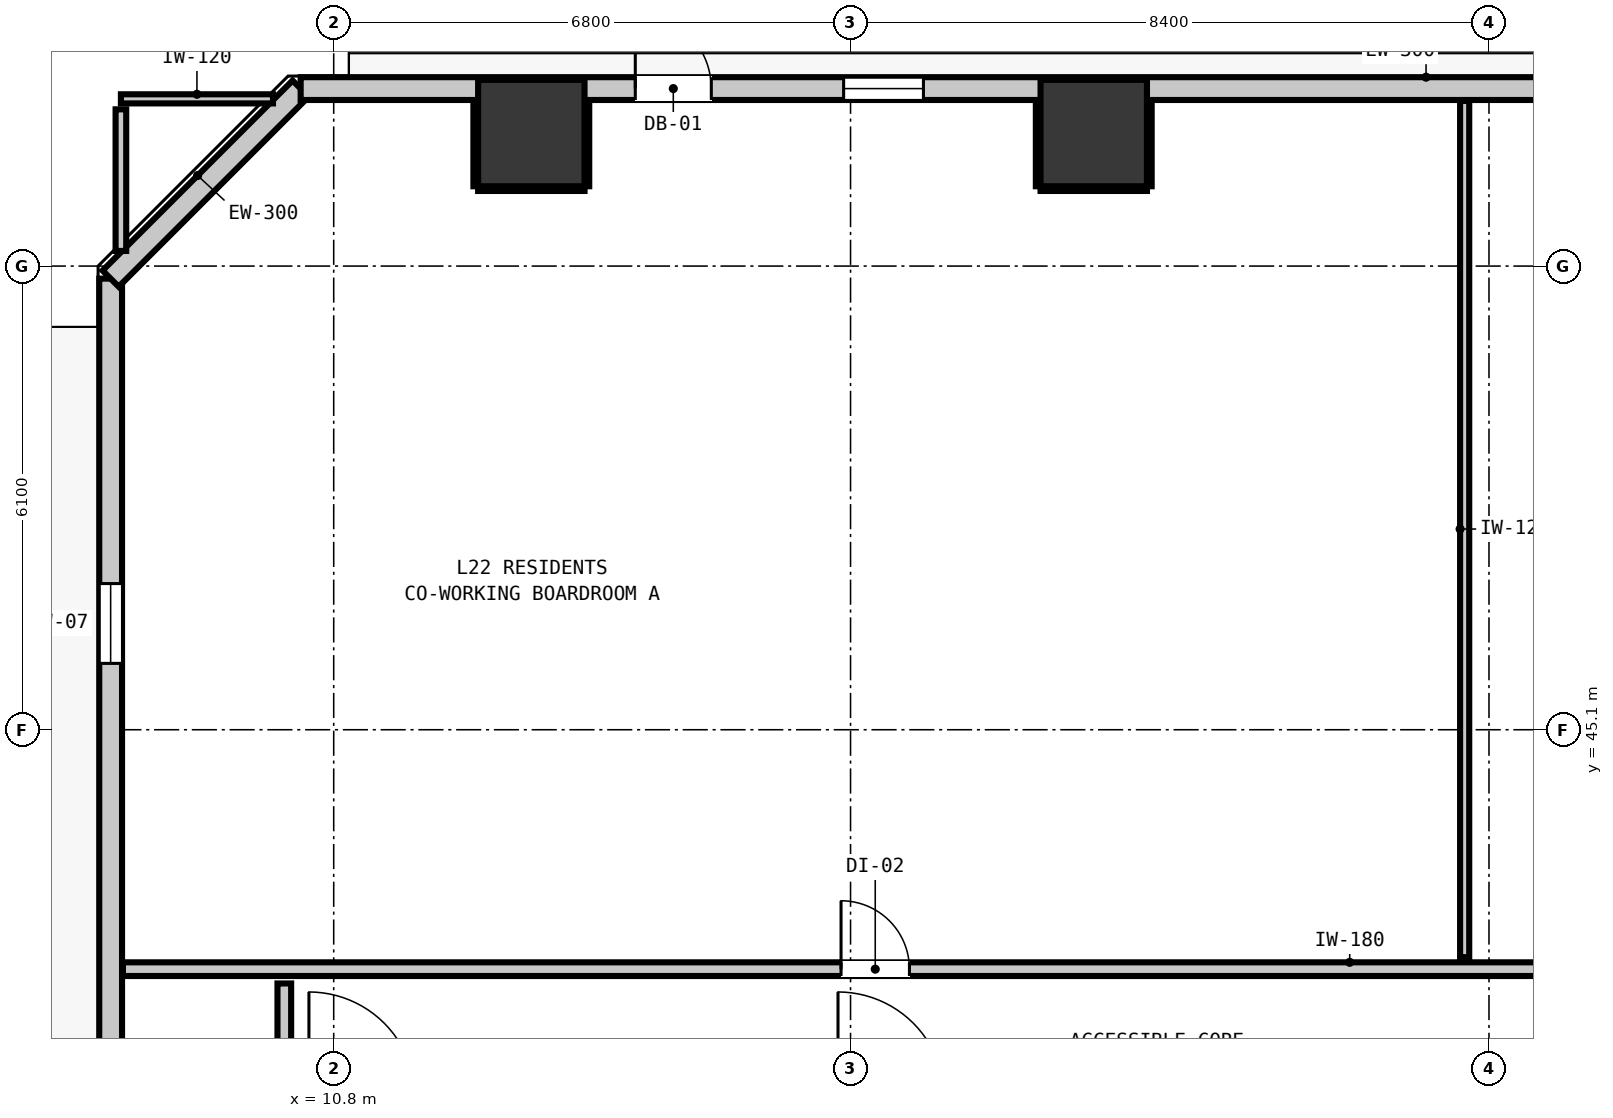
"""IFC4 building model, lengths in metres.
Left out: names, types, materials, properties, quantities, classifications, styles, units other than length and angle.
Written with IfcOpenShell. Run it as: python <this file> out.ifc"""

import sys

from ifc_helpers import new_model, si_unit, direction, frame, frame_2d, origin, origin_2d, place, context, subcontext, project, spatial, rectangle, extrude, element, fill, save


model = new_model("IFC4")
c1 = context("Model", 3, precision=1e-05, world=origin(), true_north=direction((0.0, 1.0)))
c2 = subcontext(c1, "Body", "Model", "MODEL_VIEW")
j1 = project(units=[si_unit("LENGTHUNIT", "METRE"), si_unit("PLANEANGLEUNIT", "RADIAN")], contexts=[c1])
p1 = place(None, origin())
s1 = spatial("IfcSite", under=j1, at=p1, CompositionType="ELEMENT")
p2 = place(p1, origin())
s2 = spatial("IfcBuilding", under=s1, at=p2, CompositionType="ELEMENT")
p3 = place(p2, frame((0.0, 0.0, 78.44)))
s3 = spatial("IfcBuildingStorey", under=s2, at=p3, CompositionType="ELEMENT", Elevation=78.44)
for number, where, z_axis, x_axis in (
    (1, (13.4, 52.95, 0.0), (0.0, 0.0, 1.0), (1.0, 0.0, 0.0)),
    (2, (20.8, 52.95, 0.0), (0.0, 0.0, 1.0), (1.0, 0.0, 0.0)),
):
    element("IfcColumn", number, at=place(p3, frame(where, z_axis=z_axis, x_axis=x_axis)), inside=s3, PredefinedType="COLUMN", context=c2, shape_type="SweptSolid", body=[
        extrude(rectangle(XDim=1.4, YDim=1.4, at=origin_2d()), origin(), (0.0, 0.0, 1.0), 2.9),
    ])
p4 = place(p3, frame((7.865, 16.365, 0.0), z_axis=(0.0, 0.0, 1.0), x_axis=(0.0, 1.0, 0.0)))
e3 = element("IfcWall", 3, at=p4, inside=s3, PredefinedType="STANDARD", context=c2, shape_type="SweptSolid", body=[
    extrude(rectangle(XDim=34.67, YDim=0.3, at=frame_2d((17.335, 0.0))), origin(), (0.0, 0.0, 1.0), 2.9),
])
p5 = place(p4, frame((6.854, 0.0, 0.0)))
e4 = element("IfcOpeningElement", 4, at=p5, cuts=e3, PredefinedType="OPENING", context=c2, shape_type="SweptSolid", body=[
    extrude(rectangle(XDim=1.0, YDim=2.15, at=frame_2d((0.5, 1.075))), frame((0.0, 0.16, 0.0), z_axis=(0.0, -1.0, 0.0), x_axis=(1.0, 0.0, 0.0)), (0.0, 0.0, 1.0), 0.32),
])
p6 = place(p4, frame((29.608, 0.0, 0.85)))
e5 = element("IfcOpeningElement", 5, at=p6, cuts=e3, PredefinedType="OPENING", context=c2, shape_type="SweptSolid", body=[
    extrude(rectangle(XDim=1.05, YDim=1.65, at=frame_2d((0.525, 0.825))), frame((0.0, 0.16, 0.0), z_axis=(0.0, -1.0, 0.0), x_axis=(1.0, 0.0, 0.0)), (0.0, 0.0, 1.0), 0.32),
])
p7 = place(p4, frame((10.325, 0.0, 0.85)))
e6 = element("IfcOpeningElement", 6, at=p7, cuts=e3, PredefinedType="OPENING", context=c2, shape_type="SweptSolid", body=[
    extrude(rectangle(XDim=1.05, YDim=1.65, at=frame_2d((0.525, 0.825))), frame((0.0, 0.16, 0.0), z_axis=(0.0, -1.0, 0.0), x_axis=(1.0, 0.0, 0.0)), (0.0, 0.0, 1.0), 0.32),
])
p8 = place(p3, frame((7.865, 51.035, 0.0), z_axis=(0.0, 0.0, 1.0), x_axis=(0.707106781187, 0.707106781187, 0.0)))
e7 = element("IfcWall", 7, at=p8, inside=s3, PredefinedType="STANDARD", context=c2, shape_type="SweptSolid", body=[
    extrude(rectangle(XDim=3.536, YDim=0.3, at=frame_2d((1.768, 0.0))), origin(), (0.0, 0.0, 1.0), 2.9),
])
p9 = place(p3, frame((10.365, 53.535, 0.0), z_axis=(0.0, 0.0, 1.0), x_axis=(1.0, 0.0, 0.0)))
e8 = element("IfcWall", 8, at=p9, inside=s3, PredefinedType="STANDARD", context=c2, shape_type="SweptSolid", body=[
    extrude(rectangle(XDim=37.47, YDim=0.3, at=frame_2d((18.735, 0.0))), origin(), (0.0, 0.0, 1.0), 2.9),
])
p10 = place(p9, frame((4.403, 0.0, 0.0)))
e9 = element("IfcOpeningElement", 9, at=p10, cuts=e8, PredefinedType="OPENING", context=c2, shape_type="SweptSolid", body=[
    extrude(rectangle(XDim=1.0, YDim=2.15, at=frame_2d((0.5, 1.075))), frame((0.0, 0.16, 0.0), z_axis=(0.0, -1.0, 0.0), x_axis=(1.0, 0.0, 0.0)), (0.0, 0.0, 1.0), 0.32),
])
p11 = place(p9, frame((7.144, 0.0, 0.85)))
e10 = element("IfcOpeningElement", 10, at=p11, cuts=e8, PredefinedType="OPENING", context=c2, shape_type="SweptSolid", body=[
    extrude(rectangle(XDim=1.05, YDim=1.65, at=frame_2d((0.525, 0.825))), frame((0.0, 0.16, 0.0), z_axis=(0.0, -1.0, 0.0), x_axis=(1.0, 0.0, 0.0)), (0.0, 0.0, 1.0), 0.32),
])
p12 = place(p9, frame((21.42, 0.0, 0.85)))
e11 = element("IfcOpeningElement", 11, at=p12, cuts=e8, PredefinedType="OPENING", context=c2, shape_type="SweptSolid", body=[
    extrude(rectangle(XDim=1.05, YDim=1.65, at=frame_2d((0.525, 0.825))), frame((0.0, 0.16, 0.0), z_axis=(0.0, -1.0, 0.0), x_axis=(1.0, 0.0, 0.0)), (0.0, 0.0, 1.0), 0.32),
])
p13 = place(p9, frame((31.038, 0.0, 0.85)))
e12 = element("IfcOpeningElement", 12, at=p13, cuts=e8, PredefinedType="OPENING", context=c2, shape_type="SweptSolid", body=[
    extrude(rectangle(XDim=1.05, YDim=1.65, at=frame_2d((0.525, 0.825))), frame((0.0, 0.16, 0.0), z_axis=(0.0, -1.0, 0.0), x_axis=(1.0, 0.0, 0.0)), (0.0, 0.0, 1.0), 0.32),
])
p14 = place(p9, frame((27.107, 0.0, 0.85)))
e13 = element("IfcOpeningElement", 13, at=p14, cuts=e8, PredefinedType="OPENING", context=c2, shape_type="SweptSolid", body=[
    extrude(rectangle(XDim=0.58, YDim=1.5, at=frame_2d((0.29, 0.75))), frame((0.0, 0.16, 0.0), z_axis=(0.0, -1.0, 0.0), x_axis=(1.0, 0.0, 0.0)), (0.0, 0.0, 1.0), 0.32),
])
p15 = place(p9, frame((35.748, 0.0, 0.85)))
e14 = element("IfcOpeningElement", 14, at=p15, cuts=e8, PredefinedType="OPENING", context=c2, shape_type="SweptSolid", body=[
    extrude(rectangle(XDim=1.05, YDim=1.65, at=frame_2d((0.525, 0.825))), frame((0.0, 0.16, 0.0), z_axis=(0.0, -1.0, 0.0), x_axis=(1.0, 0.0, 0.0)), (0.0, 0.0, 1.0), 0.32),
])
p16 = place(p3, frame((8.027, 41.95, 0.0), z_axis=(0.0, 0.0, 1.0), x_axis=(1.0, 0.0, 0.0)))
e15 = element("IfcWall", 15, at=p16, inside=s3, PredefinedType="PARTITIONING", context=c2, shape_type="SweptSolid", body=[
    extrude(rectangle(XDim=42.146, YDim=0.18, at=frame_2d((21.073, 0.0))), origin(), (0.0, 0.0, 1.0), 2.9),
])
p17 = place(p16, frame((9.448, 0.0, 0.0)))
e16 = element("IfcOpeningElement", 16, at=p17, cuts=e15, PredefinedType="OPENING", context=c2, shape_type="SweptSolid", body=[
    extrude(rectangle(XDim=0.9, YDim=2.1, at=frame_2d((0.45, 1.05))), frame((0.0, 0.1, 0.0), z_axis=(0.0, -1.0, 0.0), x_axis=(1.0, 0.0, 0.0)), (0.0, 0.0, 1.0), 0.2),
])
p18 = place(p16, frame((21.933, 0.0, 0.0)))
e17 = element("IfcOpeningElement", 17, at=p18, cuts=e15, PredefinedType="OPENING", context=c2, shape_type="SweptSolid", body=[
    extrude(rectangle(XDim=0.9, YDim=2.1, at=frame_2d((0.45, 1.05))), frame((0.0, 0.1, 0.0), z_axis=(0.0, -1.0, 0.0), x_axis=(1.0, 0.0, 0.0)), (0.0, 0.0, 1.0), 0.2),
])
p19 = place(p16, frame((33.401, 0.0, 0.0)))
e18 = element("IfcOpeningElement", 18, at=p19, cuts=e15, PredefinedType="OPENING", context=c2, shape_type="SweptSolid", body=[
    extrude(rectangle(XDim=1.0, YDim=2.15, at=frame_2d((0.5, 1.075))), frame((0.0, 0.1, 0.0), z_axis=(0.0, -1.0, 0.0), x_axis=(1.0, 0.0, 0.0)), (0.0, 0.0, 1.0), 0.2),
])
p20 = place(p3, frame((8.0, 53.4, 0.0), z_axis=(0.0, 0.0, 1.0), x_axis=(1.0, 0.0, 0.0)))
e19 = element("IfcWall", 19, at=p20, inside=s3, PredefinedType="PARTITIONING", context=c2, shape_type="SweptSolid", body=[
    extrude(rectangle(XDim=2.001, YDim=0.12, at=frame_2d((1.0, 0.0))), origin(), (0.0, 0.0, 1.0), 2.9),
])
p21 = place(p3, frame((10.15, 40.438, 0.0), z_axis=(0.0, 0.0, 1.0), x_axis=(0.0, 1.0, 0.0)))
e20 = element("IfcWall", 20, at=p21, inside=s3, PredefinedType="PARTITIONING", context=c2, shape_type="SweptSolid", body=[
    extrude(rectangle(XDim=1.324, YDim=0.18, at=frame_2d((0.662, 0.0))), origin(), (0.0, 0.0, 1.0), 2.9),
])
p22 = place(p3, frame((8.0, 51.399, 0.0), z_axis=(0.0, 0.0, 1.0), x_axis=(0.0, 1.0, 0.0)))
e21 = element("IfcWall", 21, at=p22, inside=s3, PredefinedType="PARTITIONING", context=c2, shape_type="SweptSolid", body=[
    extrude(rectangle(XDim=1.863, YDim=0.14, at=frame_2d((0.932, 0.0))), origin(), (0.0, 0.0, 1.0), 2.9),
])
p23 = place(p3, frame((25.68, 42.108, 0.0), z_axis=(0.0, 0.0, 1.0), x_axis=(0.0, 1.0, 0.0)))
e22 = element("IfcWall", 22, at=p23, inside=s3, PredefinedType="PARTITIONING", context=c2, shape_type="SweptSolid", body=[
    extrude(rectangle(XDim=11.265, YDim=0.12, at=frame_2d((5.633, 0.0))), origin(), (0.0, 0.0, 1.0), 2.9),
])
p24 = place(p3, frame((12.7, 52.218, 0.0), z_axis=(0.0, 0.0, 1.0), x_axis=(1.0, 0.0, 0.0)))
e23 = element("IfcWall", 23, at=p24, inside=s3, PredefinedType="PARTITIONING", context=c2, shape_type="SweptSolid", body=[
    extrude(rectangle(XDim=1.4, YDim=0.06, at=frame_2d((0.7, 0.0))), origin(), (0.0, 0.0, 1.0), 1.45),
])
for number, where, z_axis, x_axis in (
    (24, (12.668, 52.25, 0.0), (0.0, 0.0, 1.0), (0.0, 1.0, 0.0)),
    (25, (14.132, 52.25, 0.0), (0.0, 0.0, 1.0), (0.0, 1.0, 0.0)),
):
    element("IfcWall", number, at=place(p3, frame(where, z_axis=z_axis, x_axis=x_axis)), inside=s3, PredefinedType="PARTITIONING", context=c2, shape_type="SweptSolid", body=[
        extrude(rectangle(XDim=1.12, YDim=0.06, at=frame_2d((0.56, 0.0))), origin(), (0.0, 0.0, 1.0), 1.45),
    ])
p25 = place(p3, frame((20.1, 52.218, 0.0), z_axis=(0.0, 0.0, 1.0), x_axis=(1.0, 0.0, 0.0)))
e26 = element("IfcWall", 26, at=p25, inside=s3, PredefinedType="PARTITIONING", context=c2, shape_type="SweptSolid", body=[
    extrude(rectangle(XDim=1.4, YDim=0.06, at=frame_2d((0.7, 0.0))), origin(), (0.0, 0.0, 1.0), 1.45),
])
for number, where, z_axis, x_axis in (
    (27, (20.068, 52.25, 0.0), (0.0, 0.0, 1.0), (0.0, 1.0, 0.0)),
    (28, (21.532, 52.25, 0.0), (0.0, 0.0, 1.0), (0.0, 1.0, 0.0)),
):
    element("IfcWall", number, at=place(p3, frame(where, z_axis=z_axis, x_axis=x_axis)), inside=s3, PredefinedType="PARTITIONING", context=c2, shape_type="SweptSolid", body=[
        extrude(rectangle(XDim=1.12, YDim=0.06, at=frame_2d((0.56, 0.0))), origin(), (0.0, 0.0, 1.0), 1.45),
    ])
p26 = place(p10, origin())
e29 = element("IfcDoor", 29, at=p26, inside=s3, OperationType="SINGLE_SWING_LEFT", PredefinedType="DOOR", context=c2, shape_type="SweptSolid", body=[
    extrude(rectangle(XDim=1.0, YDim=2.15, at=frame_2d((0.5, 1.075))), frame((0.0, 0.025, 0.0), z_axis=(0.0, -1.0, 0.0), x_axis=(1.0, 0.0, 0.0)), (0.0, 0.0, 1.0), 0.05),
])
fill(e9, e29)
p27 = place(p6, origin())
e30 = element("IfcWindow", 30, at=p27, inside=s3, PartitioningType="SINGLE_PANEL", PredefinedType="WINDOW", context=c2, shape_type="SweptSolid", body=[
    extrude(rectangle(XDim=1.05, YDim=1.65, at=frame_2d((0.525, 0.825))), frame((0.0, 0.03, 0.0), z_axis=(0.0, -1.0, 0.0), x_axis=(1.0, 0.0, 0.0)), (0.0, 0.0, 1.0), 0.06),
])
fill(e5, e30)
p28 = place(p11, origin())
e31 = element("IfcWindow", 31, at=p28, inside=s3, PartitioningType="SINGLE_PANEL", PredefinedType="WINDOW", context=c2, shape_type="SweptSolid", body=[
    extrude(rectangle(XDim=1.05, YDim=1.65, at=frame_2d((0.525, 0.825))), frame((0.0, 0.03, 0.0), z_axis=(0.0, -1.0, 0.0), x_axis=(1.0, 0.0, 0.0)), (0.0, 0.0, 1.0), 0.06),
])
fill(e10, e31)
p29 = place(p17, origin())
e32 = element("IfcDoor", 32, at=p29, inside=s3, OperationType="SINGLE_SWING_LEFT", PredefinedType="DOOR", context=c2, shape_type="SweptSolid", body=[
    extrude(rectangle(XDim=0.9, YDim=2.1, at=frame_2d((0.45, 1.05))), frame((0.0, 0.025, 0.0), z_axis=(0.0, -1.0, 0.0), x_axis=(1.0, 0.0, 0.0)), (0.0, 0.0, 1.0), 0.05),
])
fill(e16, e32)
save(model, sys.argv[1])
